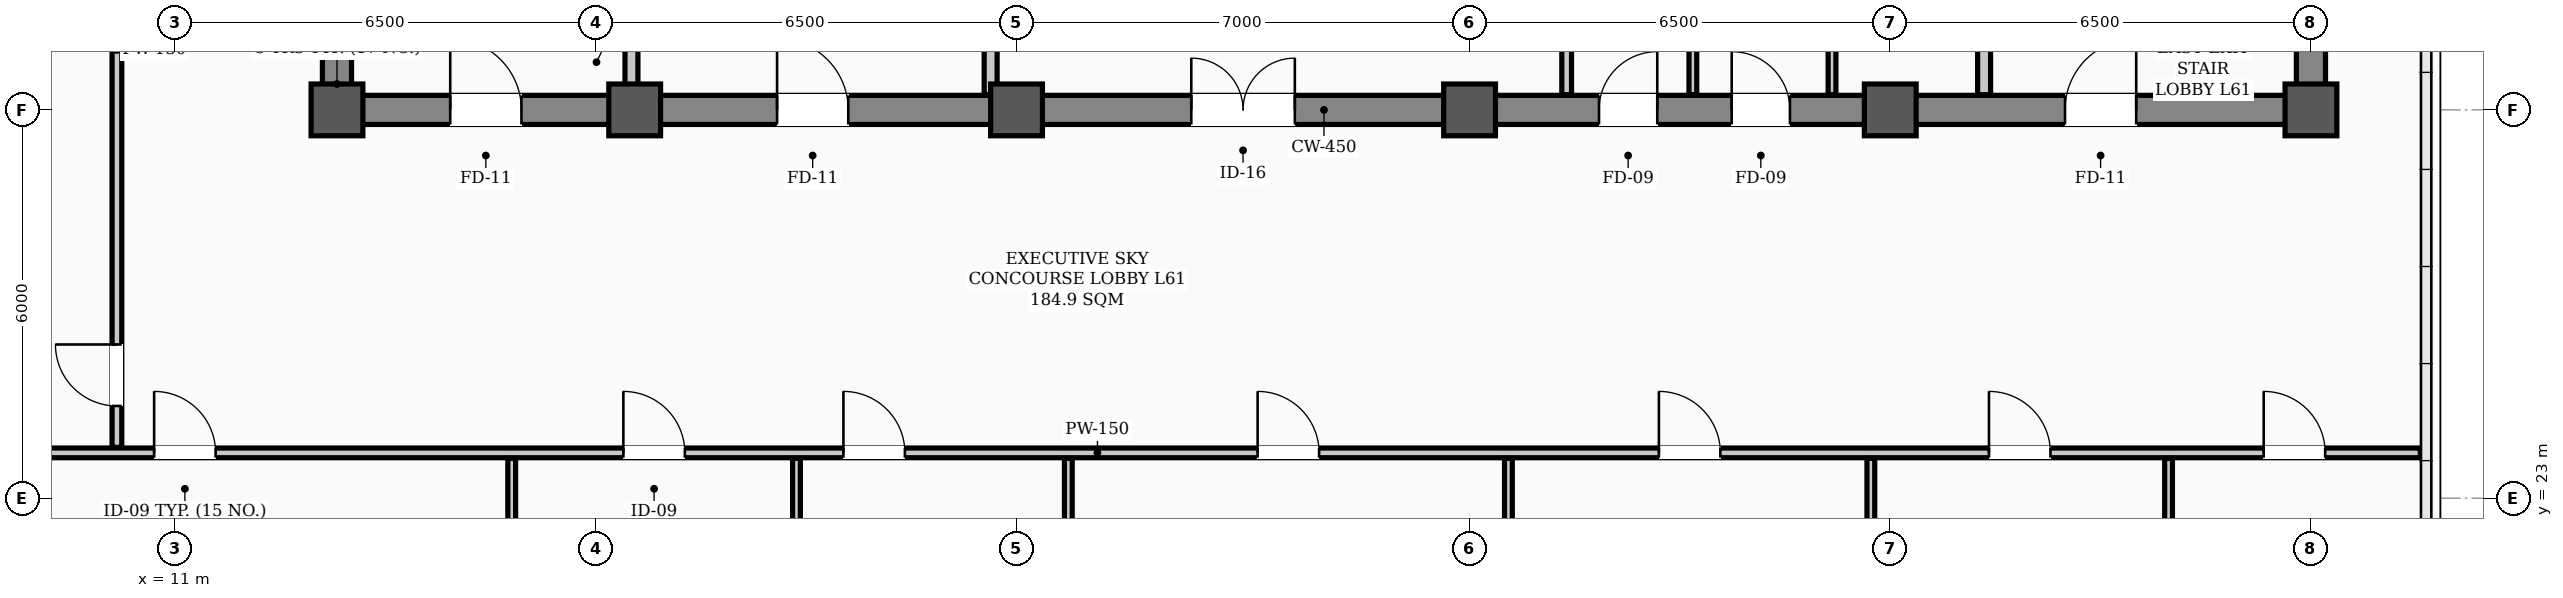
"""IFC4 building model, lengths in metres.
Left out: names, types, materials, properties, quantities, classifications, styles, units other than length and angle.
Written with IfcOpenShell. Run it as: python <this file> out.ifc"""

import sys

from ifc_helpers import new_model, si_unit, direction, frame, frame_2d, origin, origin_2d, place, context, subcontext, project, spatial, rectangle, hollow_rectangle, extrude, element, fill, save


model = new_model("IFC4")
c1 = context("Model", 3, precision=1e-05, world=origin(), true_north=direction((0.0, 1.0)))
c2 = subcontext(c1, "Body", "Model", "MODEL_VIEW")
j1 = project(units=[si_unit("LENGTHUNIT", "METRE"), si_unit("PLANEANGLEUNIT", "RADIAN")], contexts=[c1])
p1 = place(None, origin())
s1 = spatial("IfcSite", under=j1, at=p1, CompositionType="ELEMENT")
p2 = place(p1, origin())
s2 = spatial("IfcBuilding", under=s1, at=p2, CompositionType="ELEMENT")
p3 = place(p2, frame((0.0, 0.0, 246.2)))
s3 = spatial("IfcBuildingStorey", under=s2, at=p3, CompositionType="ELEMENT", Elevation=246.2)
for number, where, z_axis, x_axis in (
    (1, (13.5, 29.0, 0.0), (0.0, 0.0, 1.0), (1.0, 0.0, 0.0)),
    (2, (18.1, 29.0, 0.0), (0.0, 0.0, 1.0), (1.0, 0.0, 0.0)),
    (3, (24.0, 29.0, 0.0), (0.0, 0.0, 1.0), (1.0, 0.0, 0.0)),
    (4, (31.0, 29.0, 0.0), (0.0, 0.0, 1.0), (1.0, 0.0, 0.0)),
    (5, (37.5, 29.0, 0.0), (0.0, 0.0, 1.0), (1.0, 0.0, 0.0)),
    (6, (44.0, 29.0, 0.0), (0.0, 0.0, 1.0), (1.0, 0.0, 0.0)),
):
    element("IfcColumn", number, at=place(p3, frame(where, z_axis=z_axis, x_axis=x_axis)), inside=s3, PredefinedType="COLUMN", context=c2, shape_type="SweptSolid", body=[
        extrude(hollow_rectangle(XDim=0.8, YDim=0.8, WallThickness=0.032, InnerFilletRadius=0.016, OuterFilletRadius=0.048, at=origin_2d()), origin(), (0.0, 0.0, 1.0), 3.9),
    ])
p4 = place(p3, frame((13.5, 29.0, 0.0), z_axis=(0.0, 0.0, 1.0), x_axis=(1.0, 0.0, 0.0)))
e7 = element("IfcWall", 7, at=p4, inside=s3, PredefinedType="SHEAR", context=c2, shape_type="SweptSolid", body=[
    extrude(rectangle(XDim=30.5, YDim=0.45, at=frame_2d((15.25, 0.0))), origin(), (0.0, 0.0, 1.0), 3.72),
])
p5 = place(p4, frame((1.75, 0.0, 0.0)))
e8 = element("IfcOpeningElement", 8, at=p5, cuts=e7, PredefinedType="OPENING", context=c2, shape_type="SweptSolid", body=[
    extrude(rectangle(XDim=1.1, YDim=2.08, at=frame_2d((0.55, 1.04))), frame((0.0, 0.235, 0.0), z_axis=(0.0, -1.0, 0.0), x_axis=(1.0, 0.0, 0.0)), (0.0, 0.0, 1.0), 0.47),
])
p6 = place(p4, frame((26.7, 0.0, 0.0)))
e9 = element("IfcOpeningElement", 9, at=p6, cuts=e7, PredefinedType="OPENING", context=c2, shape_type="SweptSolid", body=[
    extrude(rectangle(XDim=1.1, YDim=2.08, at=frame_2d((0.55, 1.04))), frame((0.0, 0.235, 0.0), z_axis=(0.0, -1.0, 0.0), x_axis=(1.0, 0.0, 0.0)), (0.0, 0.0, 1.0), 0.47),
])
p7 = place(p4, frame((6.8, 0.0, 0.0)))
e10 = element("IfcOpeningElement", 10, at=p7, cuts=e7, PredefinedType="OPENING", context=c2, shape_type="SweptSolid", body=[
    extrude(rectangle(XDim=1.1, YDim=2.08, at=frame_2d((0.55, 1.04))), frame((0.0, 0.235, 0.0), z_axis=(0.0, -1.0, 0.0), x_axis=(1.0, 0.0, 0.0)), (0.0, 0.0, 1.0), 0.47),
])
p8 = place(p4, frame((13.2, 0.0, 0.0)))
e11 = element("IfcOpeningElement", 11, at=p8, cuts=e7, PredefinedType="OPENING", context=c2, shape_type="SweptSolid", body=[
    extrude(rectangle(XDim=1.6, YDim=2.08, at=frame_2d((0.8, 1.04))), frame((0.0, 0.235, 0.0), z_axis=(0.0, -1.0, 0.0), x_axis=(1.0, 0.0, 0.0)), (0.0, 0.0, 1.0), 0.47),
])
p9 = place(p4, frame((19.5, 0.0, 0.0)))
e12 = element("IfcOpeningElement", 12, at=p9, cuts=e7, PredefinedType="OPENING", context=c2, shape_type="SweptSolid", body=[
    extrude(rectangle(XDim=0.9, YDim=2.08, at=frame_2d((0.45, 1.04))), frame((0.0, 0.235, 0.0), z_axis=(0.0, -1.0, 0.0), x_axis=(1.0, 0.0, 0.0)), (0.0, 0.0, 1.0), 0.47),
])
p10 = place(p4, frame((21.55, 0.0, 0.0)))
e13 = element("IfcOpeningElement", 13, at=p10, cuts=e7, PredefinedType="OPENING", context=c2, shape_type="SweptSolid", body=[
    extrude(rectangle(XDim=0.9, YDim=2.08, at=frame_2d((0.45, 1.04))), frame((0.0, 0.235, 0.0), z_axis=(0.0, -1.0, 0.0), x_axis=(1.0, 0.0, 0.0)), (0.0, 0.0, 1.0), 0.47),
])
for number, where, z_axis, x_axis in (
    (14, (13.5, 29.35, 0.0), (0.0, 0.0, 1.0), (0.0, 1.0, 0.0)),
    (15, (44.0, 29.35, 0.0), (0.0, 0.0, 1.0), (0.0, 1.0, 0.0)),
):
    element("IfcWall", number, at=place(p3, frame(where, z_axis=z_axis, x_axis=x_axis)), inside=s3, PredefinedType="SHEAR", context=c2, shape_type="SweptSolid", body=[
        extrude(rectangle(XDim=8.6, YDim=0.45, at=frame_2d((4.3, 0.0))), origin(), (0.0, 0.0, 1.0), 3.72),
    ])
p11 = place(p3, frame((4.81, 23.7, 0.0), z_axis=(0.0, 0.0, 1.0), x_axis=(1.0, 0.0, 0.0)))
e16 = element("IfcWall", 16, at=p11, inside=s3, PredefinedType="PARTITIONING", context=c2, shape_type="SweptSolid", body=[
    extrude(rectangle(XDim=40.88, YDim=0.15, at=frame_2d((20.44, 0.0))), origin(), (0.0, 0.0, 1.0), 3.2),
])
p12 = place(p11, frame((5.865, 0.0, 0.0)))
e17 = element("IfcOpeningElement", 17, at=p12, cuts=e16, PredefinedType="OPENING", context=c2, shape_type="SweptSolid", body=[
    extrude(rectangle(XDim=0.95, YDim=2.08, at=frame_2d((0.475, 1.04))), frame((0.0, 0.085, 0.0), z_axis=(0.0, -1.0, 0.0), x_axis=(1.0, 0.0, 0.0)), (0.0, 0.0, 1.0), 0.17),
])
p13 = place(p11, frame((13.115, 0.0, 0.0)))
e18 = element("IfcOpeningElement", 18, at=p13, cuts=e16, PredefinedType="OPENING", context=c2, shape_type="SweptSolid", body=[
    extrude(rectangle(XDim=0.95, YDim=2.08, at=frame_2d((0.475, 1.04))), frame((0.0, 0.085, 0.0), z_axis=(0.0, -1.0, 0.0), x_axis=(1.0, 0.0, 0.0)), (0.0, 0.0, 1.0), 0.17),
])
p14 = place(p11, frame((16.515, 0.0, 0.0)))
e19 = element("IfcOpeningElement", 19, at=p14, cuts=e16, PredefinedType="OPENING", context=c2, shape_type="SweptSolid", body=[
    extrude(rectangle(XDim=0.95, YDim=2.08, at=frame_2d((0.475, 1.04))), frame((0.0, 0.085, 0.0), z_axis=(0.0, -1.0, 0.0), x_axis=(1.0, 0.0, 0.0)), (0.0, 0.0, 1.0), 0.17),
])
p15 = place(p11, frame((22.915, 0.0, 0.0)))
e20 = element("IfcOpeningElement", 20, at=p15, cuts=e16, PredefinedType="OPENING", context=c2, shape_type="SweptSolid", body=[
    extrude(rectangle(XDim=0.95, YDim=2.08, at=frame_2d((0.475, 1.04))), frame((0.0, 0.085, 0.0), z_axis=(0.0, -1.0, 0.0), x_axis=(1.0, 0.0, 0.0)), (0.0, 0.0, 1.0), 0.17),
])
p16 = place(p11, frame((29.115, 0.0, 0.0)))
e21 = element("IfcOpeningElement", 21, at=p16, cuts=e16, PredefinedType="OPENING", context=c2, shape_type="SweptSolid", body=[
    extrude(rectangle(XDim=0.95, YDim=2.08, at=frame_2d((0.475, 1.04))), frame((0.0, 0.085, 0.0), z_axis=(0.0, -1.0, 0.0), x_axis=(1.0, 0.0, 0.0)), (0.0, 0.0, 1.0), 0.17),
])
p17 = place(p11, frame((34.215, 0.0, 0.0)))
e22 = element("IfcOpeningElement", 22, at=p17, cuts=e16, PredefinedType="OPENING", context=c2, shape_type="SweptSolid", body=[
    extrude(rectangle(XDim=0.95, YDim=2.08, at=frame_2d((0.475, 1.04))), frame((0.0, 0.085, 0.0), z_axis=(0.0, -1.0, 0.0), x_axis=(1.0, 0.0, 0.0)), (0.0, 0.0, 1.0), 0.17),
])
p18 = place(p11, frame((38.46, 0.0, 0.0)))
e23 = element("IfcOpeningElement", 23, at=p18, cuts=e16, PredefinedType="OPENING", context=c2, shape_type="SweptSolid", body=[
    extrude(rectangle(XDim=0.95, YDim=2.08, at=frame_2d((0.475, 1.04))), frame((0.0, 0.085, 0.0), z_axis=(0.0, -1.0, 0.0), x_axis=(1.0, 0.0, 0.0)), (0.0, 0.0, 1.0), 0.17),
])
p19 = place(p3, frame((18.05, 29.235, 0.0), z_axis=(0.0, 0.0, 1.0), x_axis=(0.0, 1.0, 0.0)))
e24 = element("IfcWall", 24, at=p19, inside=s3, PredefinedType="STANDARD", context=c2, shape_type="SweptSolid", body=[
    extrude(rectangle(XDim=1.065, YDim=0.2, at=frame_2d((0.532, 0.0))), origin(), (0.0, 0.0, 1.0), 3.35),
])
p20 = place(p3, frame((38.95, 29.235, 0.0), z_axis=(0.0, 0.0, 1.0), x_axis=(0.0, 1.0, 0.0)))
e25 = element("IfcWall", 25, at=p20, inside=s3, PredefinedType="STANDARD", context=c2, shape_type="SweptSolid", body=[
    extrude(rectangle(XDim=1.065, YDim=0.2, at=frame_2d((0.532, 0.0))), origin(), (0.0, 0.0, 1.0), 3.72),
])
p21 = place(p3, frame((23.6, 29.235, 0.0), z_axis=(0.0, 0.0, 1.0), x_axis=(0.0, 1.0, 0.0)))
e26 = element("IfcWall", 26, at=p21, inside=s3, PredefinedType="STANDARD", context=c2, shape_type="SweptSolid", body=[
    extrude(rectangle(XDim=5.465, YDim=0.2, at=frame_2d((2.732, 0.0))), origin(), (0.0, 0.0, 1.0), 3.2),
])
p22 = place(p3, frame((32.5, 29.235, 0.0), z_axis=(0.0, 0.0, 1.0), x_axis=(0.0, 1.0, 0.0)))
e27 = element("IfcWall", 27, at=p22, inside=s3, PredefinedType="PARTITIONING", context=c2, shape_type="SweptSolid", body=[
    extrude(rectangle(XDim=2.53, YDim=0.15, at=frame_2d((1.265, 0.0))), origin(), (0.0, 0.0, 1.0), 3.35),
])
for number, where, z_axis, x_axis in (
    (28, (36.6, 29.235, 0.0), (0.0, 0.0, 1.0), (0.0, 1.0, 0.0)),
    (29, (34.45, 29.235, 0.0), (0.0, 0.0, 1.0), (0.0, 1.0, 0.0)),
):
    element("IfcWall", number, at=place(p3, frame(where, z_axis=z_axis, x_axis=x_axis)), inside=s3, PredefinedType="PARTITIONING", context=c2, shape_type="SweptSolid", body=[
        extrude(rectangle(XDim=2.53, YDim=0.12, at=frame_2d((1.265, 0.0))), origin(), (0.0, 0.0, 1.0), 3.35),
    ])
p23 = place(p3, frame((10.1, 23.785, 0.0), z_axis=(0.0, 0.0, 1.0), x_axis=(0.0, 1.0, 0.0)))
e30 = element("IfcWall", 30, at=p23, inside=s3, PredefinedType="PARTITIONING", context=c2, shape_type="SweptSolid", body=[
    extrude(rectangle(XDim=12.28, YDim=0.15, at=frame_2d((6.14, 0.0))), origin(), (0.0, 0.0, 1.0), 3.1),
])
p24 = place(p23, frame((0.64, 0.0, 0.0)))
e31 = element("IfcOpeningElement", 31, at=p24, cuts=e30, PredefinedType="OPENING", context=c2, shape_type="SweptSolid", body=[
    extrude(rectangle(XDim=0.95, YDim=2.08, at=frame_2d((0.475, 1.04))), frame((0.0, 0.085, 0.0), z_axis=(0.0, -1.0, 0.0), x_axis=(1.0, 0.0, 0.0)), (0.0, 0.0, 1.0), 0.17),
])
for number, where, z_axis, x_axis in (
    (32, (16.2, 12.41, 0.0), (0.0, 0.0, 1.0), (0.0, 1.0, 0.0)),
    (33, (20.6, 12.41, 0.0), (0.0, 0.0, 1.0), (0.0, 1.0, 0.0)),
):
    element("IfcWall", number, at=place(p3, frame(where, z_axis=z_axis, x_axis=x_axis)), inside=s3, PredefinedType="PARTITIONING", context=c2, shape_type="SweptSolid", body=[
        extrude(rectangle(XDim=11.205, YDim=0.12, at=frame_2d((5.603, 0.0))), origin(), (0.0, 0.0, 1.0), 3.1),
    ])
p25 = place(p3, frame((24.8, 14.17, 0.0), z_axis=(0.0, 0.0, 1.0), x_axis=(0.0, 1.0, 0.0)))
e34 = element("IfcWall", 34, at=p25, inside=s3, PredefinedType="PARTITIONING", context=c2, shape_type="SweptSolid", body=[
    extrude(rectangle(XDim=9.445, YDim=0.12, at=frame_2d((4.723, 0.0))), origin(), (0.0, 0.0, 1.0), 3.1),
])
for number, where, z_axis, x_axis in (
    (35, (31.6, 12.41, 0.0), (0.0, 0.0, 1.0), (0.0, 1.0, 0.0)),
    (36, (37.2, 12.41, 0.0), (0.0, 0.0, 1.0), (0.0, 1.0, 0.0)),
):
    element("IfcWall", number, at=place(p3, frame(where, z_axis=z_axis, x_axis=x_axis)), inside=s3, PredefinedType="PARTITIONING", context=c2, shape_type="SweptSolid", body=[
        extrude(rectangle(XDim=11.205, YDim=0.12, at=frame_2d((5.603, 0.0))), origin(), (0.0, 0.0, 1.0), 3.1),
    ])
p26 = place(p3, frame((41.8, 12.41, 0.0), z_axis=(0.0, 0.0, 1.0), x_axis=(0.0, 1.0, 0.0)))
e37 = element("IfcWall", 37, at=p26, inside=s3, PredefinedType="PARTITIONING", context=c2, shape_type="SweptSolid", body=[
    extrude(rectangle(XDim=11.205, YDim=0.12, at=frame_2d((5.603, 0.0))), origin(), (0.0, 0.0, 1.0), 3.72),
])
p27 = place(p5, origin())
e38 = element("IfcDoor", 38, at=p27, inside=s3, OperationType="SINGLE_SWING_LEFT", PredefinedType="DOOR", context=c2, shape_type="SweptSolid", body=[
    extrude(rectangle(XDim=1.1, YDim=2.08, at=frame_2d((0.55, 1.04))), frame((0.0, 0.025, 0.0), z_axis=(0.0, -1.0, 0.0), x_axis=(1.0, 0.0, 0.0)), (0.0, 0.0, 1.0), 0.05),
])
fill(e8, e38)
p28 = place(p6, origin())
e39 = element("IfcDoor", 39, at=p28, inside=s3, OperationType="SINGLE_SWING_RIGHT", PredefinedType="DOOR", context=c2, shape_type="SweptSolid", body=[
    extrude(rectangle(XDim=1.1, YDim=2.08, at=frame_2d((0.55, 1.04))), frame((0.0, 0.025, 0.0), z_axis=(0.0, -1.0, 0.0), x_axis=(1.0, 0.0, 0.0)), (0.0, 0.0, 1.0), 0.05),
])
fill(e9, e39)
p29 = place(p7, origin())
e40 = element("IfcDoor", 40, at=p29, inside=s3, OperationType="SINGLE_SWING_LEFT", PredefinedType="DOOR", context=c2, shape_type="SweptSolid", body=[
    extrude(rectangle(XDim=1.1, YDim=2.08, at=frame_2d((0.55, 1.04))), frame((0.0, 0.025, 0.0), z_axis=(0.0, -1.0, 0.0), x_axis=(1.0, 0.0, 0.0)), (0.0, 0.0, 1.0), 0.05),
])
fill(e10, e40)
p30 = place(p8, origin())
e41 = element("IfcDoor", 41, at=p30, inside=s3, OperationType="DOUBLE_DOOR_SINGLE_SWING", PredefinedType="DOOR", context=c2, shape_type="SweptSolid", body=[
    extrude(rectangle(XDim=1.6, YDim=2.08, at=frame_2d((0.8, 1.04))), frame((0.0, 0.025, 0.0), z_axis=(0.0, -1.0, 0.0), x_axis=(1.0, 0.0, 0.0)), (0.0, 0.0, 1.0), 0.05),
])
fill(e11, e41)
p31 = place(p9, origin())
e42 = element("IfcDoor", 42, at=p31, inside=s3, OperationType="SINGLE_SWING_RIGHT", PredefinedType="DOOR", context=c2, shape_type="SweptSolid", body=[
    extrude(rectangle(XDim=0.9, YDim=2.08, at=frame_2d((0.45, 1.04))), frame((0.0, 0.025, 0.0), z_axis=(0.0, -1.0, 0.0), x_axis=(1.0, 0.0, 0.0)), (0.0, 0.0, 1.0), 0.05),
])
fill(e12, e42)
p32 = place(p10, origin())
e43 = element("IfcDoor", 43, at=p32, inside=s3, OperationType="SINGLE_SWING_LEFT", PredefinedType="DOOR", context=c2, shape_type="SweptSolid", body=[
    extrude(rectangle(XDim=0.9, YDim=2.08, at=frame_2d((0.45, 1.04))), frame((0.0, 0.025, 0.0), z_axis=(0.0, -1.0, 0.0), x_axis=(1.0, 0.0, 0.0)), (0.0, 0.0, 1.0), 0.05),
])
fill(e13, e43)
p33 = place(p12, origin())
e44 = element("IfcDoor", 44, at=p33, inside=s3, OperationType="SINGLE_SWING_LEFT", PredefinedType="DOOR", context=c2, shape_type="SweptSolid", body=[
    extrude(rectangle(XDim=0.95, YDim=2.08, at=frame_2d((0.475, 1.04))), frame((0.0, 0.025, 0.0), z_axis=(0.0, -1.0, 0.0), x_axis=(1.0, 0.0, 0.0)), (0.0, 0.0, 1.0), 0.05),
])
fill(e17, e44)
p34 = place(p13, origin())
e45 = element("IfcDoor", 45, at=p34, inside=s3, OperationType="SINGLE_SWING_LEFT", PredefinedType="DOOR", context=c2, shape_type="SweptSolid", body=[
    extrude(rectangle(XDim=0.95, YDim=2.08, at=frame_2d((0.475, 1.04))), frame((0.0, 0.025, 0.0), z_axis=(0.0, -1.0, 0.0), x_axis=(1.0, 0.0, 0.0)), (0.0, 0.0, 1.0), 0.05),
])
fill(e18, e45)
p35 = place(p14, origin())
e46 = element("IfcDoor", 46, at=p35, inside=s3, OperationType="SINGLE_SWING_LEFT", PredefinedType="DOOR", context=c2, shape_type="SweptSolid", body=[
    extrude(rectangle(XDim=0.95, YDim=2.08, at=frame_2d((0.475, 1.04))), frame((0.0, 0.025, 0.0), z_axis=(0.0, -1.0, 0.0), x_axis=(1.0, 0.0, 0.0)), (0.0, 0.0, 1.0), 0.05),
])
fill(e19, e46)
p36 = place(p15, origin())
e47 = element("IfcDoor", 47, at=p36, inside=s3, OperationType="SINGLE_SWING_LEFT", PredefinedType="DOOR", context=c2, shape_type="SweptSolid", body=[
    extrude(rectangle(XDim=0.95, YDim=2.08, at=frame_2d((0.475, 1.04))), frame((0.0, 0.025, 0.0), z_axis=(0.0, -1.0, 0.0), x_axis=(1.0, 0.0, 0.0)), (0.0, 0.0, 1.0), 0.05),
])
fill(e20, e47)
p37 = place(p16, origin())
e48 = element("IfcDoor", 48, at=p37, inside=s3, OperationType="SINGLE_SWING_LEFT", PredefinedType="DOOR", context=c2, shape_type="SweptSolid", body=[
    extrude(rectangle(XDim=0.95, YDim=2.08, at=frame_2d((0.475, 1.04))), frame((0.0, 0.025, 0.0), z_axis=(0.0, -1.0, 0.0), x_axis=(1.0, 0.0, 0.0)), (0.0, 0.0, 1.0), 0.05),
])
fill(e21, e48)
p38 = place(p17, origin())
e49 = element("IfcDoor", 49, at=p38, inside=s3, OperationType="SINGLE_SWING_LEFT", PredefinedType="DOOR", context=c2, shape_type="SweptSolid", body=[
    extrude(rectangle(XDim=0.95, YDim=2.08, at=frame_2d((0.475, 1.04))), frame((0.0, 0.025, 0.0), z_axis=(0.0, -1.0, 0.0), x_axis=(1.0, 0.0, 0.0)), (0.0, 0.0, 1.0), 0.05),
])
fill(e22, e49)
p39 = place(p18, origin())
e50 = element("IfcDoor", 50, at=p39, inside=s3, OperationType="SINGLE_SWING_LEFT", PredefinedType="DOOR", context=c2, shape_type="SweptSolid", body=[
    extrude(rectangle(XDim=0.95, YDim=2.08, at=frame_2d((0.475, 1.04))), frame((0.0, 0.025, 0.0), z_axis=(0.0, -1.0, 0.0), x_axis=(1.0, 0.0, 0.0)), (0.0, 0.0, 1.0), 0.05),
])
fill(e23, e50)
p40 = place(p24, origin())
e51 = element("IfcDoor", 51, at=p40, inside=s3, OperationType="SINGLE_SWING_RIGHT", PredefinedType="DOOR", context=c2, shape_type="SweptSolid", body=[
    extrude(rectangle(XDim=0.95, YDim=2.08, at=frame_2d((0.475, 1.04))), frame((0.0, 0.025, 0.0), z_axis=(0.0, -1.0, 0.0), x_axis=(1.0, 0.0, 0.0)), (0.0, 0.0, 1.0), 0.05),
])
fill(e31, e51)
save(model, sys.argv[1])
